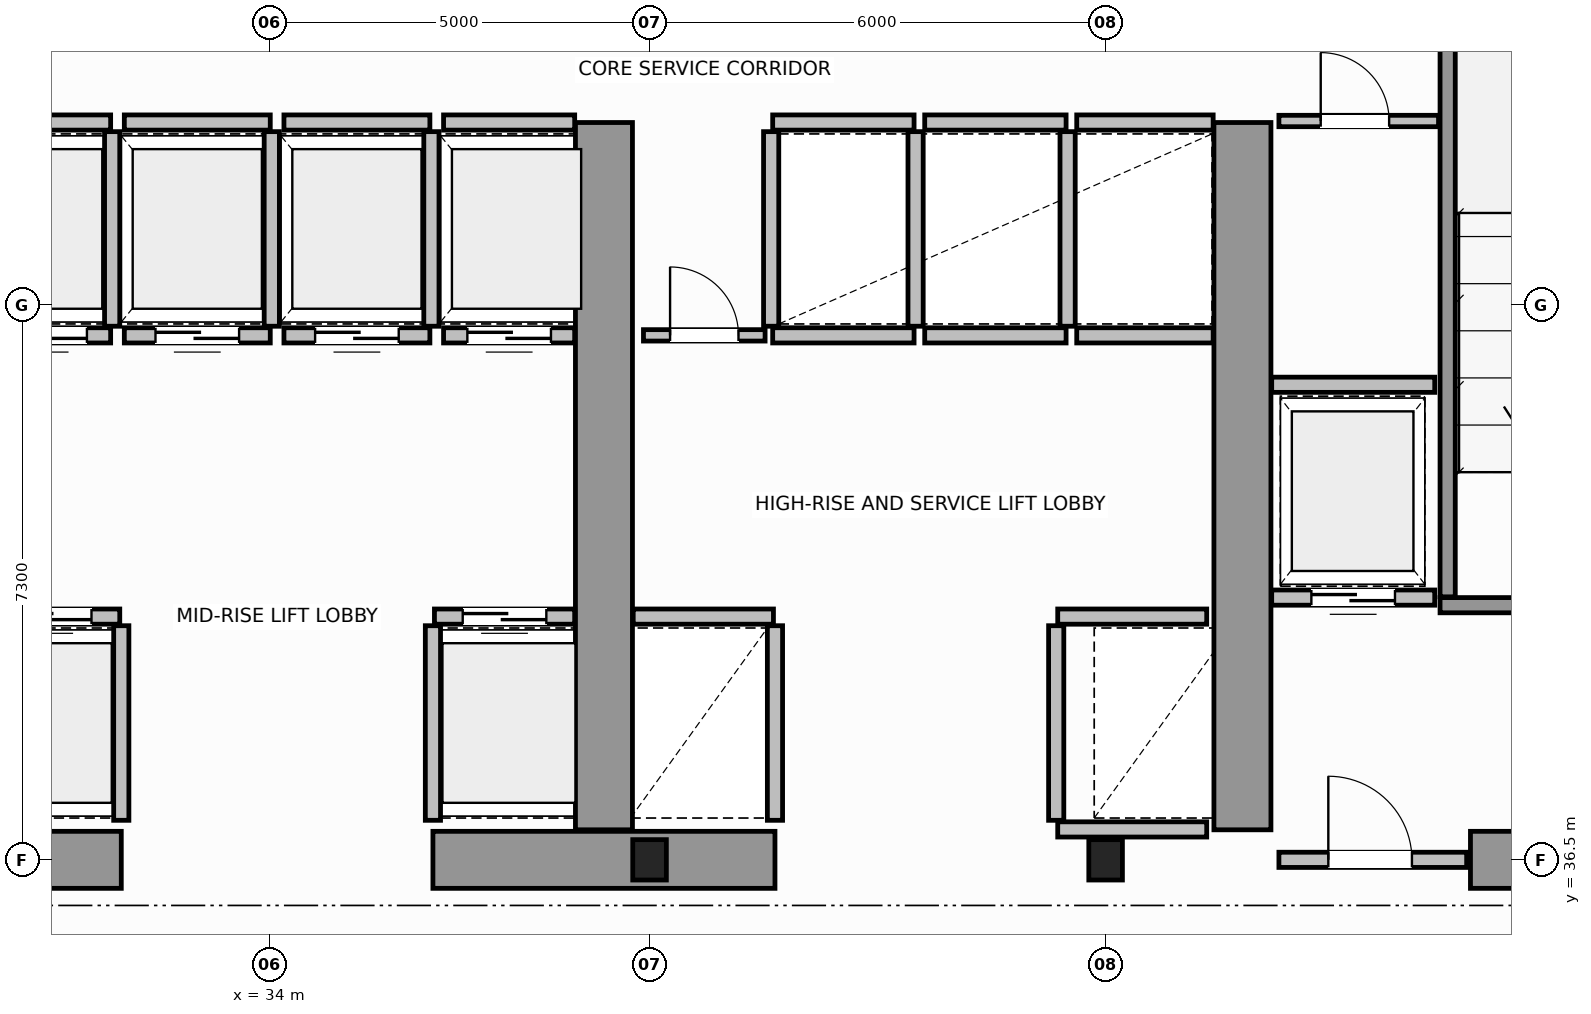
"""IFC4 building model, lengths in metres.
Left out: names, types, materials, properties, quantities, classifications, styles, units other than length and angle.
Written with IfcOpenShell. Run it as: python <this file> out.ifc"""

import sys

from ifc_helpers import new_model, si_unit, direction, frame, frame_2d, origin, origin_2d, place, context, subcontext, project, spatial, rectangle, i_section, extrude, source, transform, mapped, element, fill, save


model = new_model("IFC4")
c1 = context("Model", 3, precision=1e-05, world=origin(), true_north=direction((0.0, 1.0)))
c2 = subcontext(c1, "Body", "Model", "MODEL_VIEW")
j1 = project(units=[si_unit("LENGTHUNIT", "METRE"), si_unit("PLANEANGLEUNIT", "RADIAN")], contexts=[c1])
p1 = place(None, origin())
s1 = spatial("IfcSite", under=j1, at=p1, CompositionType="ELEMENT")
p2 = place(p1, origin())
s2 = spatial("IfcBuilding", under=s1, at=p2, CompositionType="ELEMENT")
p3 = place(p2, frame((0.0, 0.0, 114.8)))
s3 = spatial("IfcBuildingStorey", under=s2, at=p3, CompositionType="ELEMENT", Elevation=114.8)
m1 = source(origin(), c2, "Body", "SweptSolid", [
    extrude(i_section(OverallWidth=0.442, OverallDepth=0.531, WebThickness=0.065, FlangeThickness=0.076, FilletRadius=0.015, at=origin_2d()), origin(), (0.0, 0.0, 1.0), 3.8),
])
for number, where, z_axis, x_axis in (
    (1, (39.0, 36.5, 0.0), (0.0, 0.0, 1.0), (1.0, 0.0, 0.0)),
    (2, (45.0, 36.5, 0.0), (0.0, 0.0, 1.0), (1.0, 0.0, 0.0)),
):
    element("IfcColumn", number, at=place(p3, frame(where, z_axis=z_axis, x_axis=x_axis)), inside=s3, PredefinedType="COLUMN", context=c2, shape_type="MappedRepresentation", body=[
        mapped(m1, transform((0.0, 0.0, 0.0), scale=1.0)),
    ])
for number, where, z_axis, x_axis in (
    (3, (27.55, 36.5, 0.0), (0.0, 0.0, 1.0), (1.0, 0.0, 0.0)),
    (4, (36.15, 36.5, 0.0), (0.0, 0.0, 1.0), (1.0, 0.0, 0.0)),
):
    element("IfcWall", number, at=place(p3, frame(where, z_axis=z_axis, x_axis=x_axis)), inside=s3, PredefinedType="SHEAR", context=c2, shape_type="SweptSolid", body=[
        extrude(rectangle(XDim=4.5, YDim=0.75, at=frame_2d((2.25, 0.0))), origin(), (0.0, 0.0, 1.0), 3.8),
    ])
p4 = place(p3, frame((49.8, 36.5, 0.0), z_axis=(0.0, 0.0, 1.0), x_axis=(1.0, 0.0, 0.0)))
e5 = element("IfcWall", 5, at=p4, inside=s3, PredefinedType="SHEAR", context=c2, shape_type="SweptSolid", body=[
    extrude(rectangle(XDim=3.805, YDim=0.75, at=frame_2d((1.902, 0.0))), origin(), (0.0, 0.0, 1.0), 2.38),
])
for number, where, z_axis, x_axis in (
    (6, (38.4, 36.895, 0.0), (0.0, 0.0, 1.0), (0.0, 1.0, 0.0)),
    (7, (46.8, 36.895, 0.0), (0.0, 0.0, 1.0), (0.0, 1.0, 0.0)),
):
    element("IfcWall", number, at=place(p3, frame(where, z_axis=z_axis, x_axis=x_axis)), inside=s3, PredefinedType="SHEAR", context=c2, shape_type="SweptSolid", body=[
        extrude(rectangle(XDim=9.305, YDim=0.75, at=frame_2d((4.652, 0.0))), origin(), (0.0, 0.0, 1.0), 3.8),
    ])
p5 = place(p3, frame((49.4, 39.85, 0.0), z_axis=(0.0, 0.0, 1.0), x_axis=(1.0, 0.0, 0.0)))
e8 = element("IfcWall", 8, at=p5, inside=s3, PredefinedType="SOLIDWALL", context=c2, shape_type="SweptSolid", body=[
    extrude(rectangle(XDim=4.225, YDim=0.2, at=frame_2d((2.113, 0.0))), origin(), (0.0, 0.0, 1.0), 3.8),
])
p6 = place(p5, frame((1.325, 0.0, 0.0)))
e9 = element("IfcOpeningElement", 9, at=p6, cuts=e8, PredefinedType="OPENING", context=c2, shape_type="SweptSolid", body=[
    extrude(rectangle(XDim=1.1, YDim=2.15, at=frame_2d((0.55, 1.075))), frame((0.0, 0.11, 0.0), z_axis=(0.0, -1.0, 0.0), x_axis=(1.0, 0.0, 0.0)), (0.0, 0.0, 1.0), 0.22),
])
p7 = place(p3, frame((49.5, 39.96, 0.0), z_axis=(0.0, 0.0, 1.0), x_axis=(0.0, 1.0, 0.0)))
e10 = element("IfcWall", 10, at=p7, inside=s3, PredefinedType="SOLIDWALL", context=c2, shape_type="SweptSolid", body=[
    extrude(rectangle(XDim=9.93, YDim=0.2, at=frame_2d((4.965, 0.0))), origin(), (0.0, 0.0, 1.0), 3.8),
])
p8 = place(p3, frame((47.28, 36.5, 0.0), z_axis=(0.0, 0.0, 1.0), x_axis=(1.0, 0.0, 0.0)))
e11 = element("IfcWall", 11, at=p8, inside=s3, PredefinedType="SOLIDWALL", context=c2, shape_type="SweptSolid", body=[
    extrude(rectangle(XDim=2.47, YDim=0.2, at=frame_2d((1.235, 0.0))), origin(), (0.0, 0.0, 1.0), 2.37),
])
p9 = place(p8, frame((0.65, 0.0, 0.0)))
e12 = element("IfcOpeningElement", 12, at=p9, cuts=e11, PredefinedType="OPENING", context=c2, shape_type="SweptSolid", body=[
    extrude(rectangle(XDim=1.1, YDim=2.15, at=frame_2d((0.55, 1.075))), frame((0.0, 0.11, 0.0), z_axis=(0.0, -1.0, 0.0), x_axis=(1.0, 0.0, 0.0)), (0.0, 0.0, 1.0), 0.22),
])
p10 = place(p3, frame((30.185, 39.7, 0.0), z_axis=(0.0, 0.0, 1.0), x_axis=(1.0, 0.0, 0.0)))
e13 = element("IfcWall", 13, at=p10, inside=s3, PredefinedType="SOLIDWALL", context=c2, shape_type="SweptSolid", body=[
    extrude(rectangle(XDim=1.845, YDim=0.2, at=frame_2d((0.922, 0.0))), origin(), (0.0, 0.0, 1.0), 3.58),
])
p11 = place(p10, frame((0.373, 0.0, 0.0)))
e14 = element("IfcOpeningElement", 14, at=p11, cuts=e13, PredefinedType="OPENING", context=c2, shape_type="SweptSolid", body=[
    extrude(rectangle(XDim=1.1, YDim=2.15, at=frame_2d((0.55, 1.075))), frame((0.0, 0.11, 0.0), z_axis=(0.0, -1.0, 0.0), x_axis=(1.0, 0.0, 0.0)), (0.0, 0.0, 1.0), 0.22),
])
p12 = place(p3, frame((32.05, 37.02, 0.0), z_axis=(0.0, 0.0, 1.0), x_axis=(0.0, 1.0, 0.0)))
e15 = element("IfcWall", 15, at=p12, inside=s3, PredefinedType="SOLIDWALL", context=c2, shape_type="SweptSolid", body=[
    extrude(rectangle(XDim=2.56, YDim=0.2, at=frame_2d((1.28, 0.0))), origin(), (0.0, 0.0, 1.0), 3.58),
])
p13 = place(p3, frame((36.17, 39.7, 0.0), z_axis=(0.0, 0.0, 1.0), x_axis=(1.0, 0.0, 0.0)))
e16 = element("IfcWall", 16, at=p13, inside=s3, PredefinedType="SOLIDWALL", context=c2, shape_type="SweptSolid", body=[
    extrude(rectangle(XDim=1.845, YDim=0.2, at=frame_2d((0.922, 0.0))), origin(), (0.0, 0.0, 1.0), 3.58),
])
p14 = place(p13, frame((0.372, 0.0, 0.0)))
e17 = element("IfcOpeningElement", 17, at=p14, cuts=e16, PredefinedType="OPENING", context=c2, shape_type="SweptSolid", body=[
    extrude(rectangle(XDim=1.1, YDim=2.15, at=frame_2d((0.55, 1.075))), frame((0.0, 0.11, 0.0), z_axis=(0.0, -1.0, 0.0), x_axis=(1.0, 0.0, 0.0)), (0.0, 0.0, 1.0), 0.22),
])
p15 = place(p3, frame((36.15, 37.02, 0.0), z_axis=(0.0, 0.0, 1.0), x_axis=(0.0, 1.0, 0.0)))
e18 = element("IfcWall", 18, at=p15, inside=s3, PredefinedType="SOLIDWALL", context=c2, shape_type="SweptSolid", body=[
    extrude(rectangle(XDim=2.56, YDim=0.2, at=frame_2d((1.28, 0.0))), origin(), (0.0, 0.0, 1.0), 3.58),
])
p16 = place(p3, frame((30.185, 43.4, 0.0), z_axis=(0.0, 0.0, 1.0), x_axis=(1.0, 0.0, 0.0)))
e19 = element("IfcWall", 19, at=p16, inside=s3, PredefinedType="SOLIDWALL", context=c2, shape_type="SweptSolid", body=[
    extrude(rectangle(XDim=1.725, YDim=0.2, at=frame_2d((0.862, 0.0))), origin(), (0.0, 0.0, 1.0), 3.58),
])
p17 = place(p16, frame((0.313, 0.0, 0.0)))
e20 = element("IfcOpeningElement", 20, at=p17, cuts=e19, PredefinedType="OPENING", context=c2, shape_type="SweptSolid", body=[
    extrude(rectangle(XDim=1.1, YDim=2.15, at=frame_2d((0.55, 1.075))), frame((0.0, 0.11, 0.0), z_axis=(0.0, -1.0, 0.0), x_axis=(1.0, 0.0, 0.0)), (0.0, 0.0, 1.0), 0.22),
])
p18 = place(p3, frame((30.185, 46.2, 0.0), z_axis=(0.0, 0.0, 1.0), x_axis=(1.0, 0.0, 0.0)))
e21 = element("IfcWall", 21, at=p18, inside=s3, PredefinedType="SOLIDWALL", context=c2, shape_type="SweptSolid", body=[
    extrude(rectangle(XDim=1.725, YDim=0.2, at=frame_2d((0.862, 0.0))), origin(), (0.0, 0.0, 1.0), 3.58),
])
p19 = place(p3, frame((31.93, 43.52, 0.0), z_axis=(0.0, 0.0, 1.0), x_axis=(0.0, 1.0, 0.0)))
e22 = element("IfcWall", 22, at=p19, inside=s3, PredefinedType="SOLIDWALL", context=c2, shape_type="SweptSolid", body=[
    extrude(rectangle(XDim=2.56, YDim=0.2, at=frame_2d((1.28, 0.0))), origin(), (0.0, 0.0, 1.0), 3.58),
])
p20 = place(p3, frame((32.09, 43.4, 0.0), z_axis=(0.0, 0.0, 1.0), x_axis=(1.0, 0.0, 0.0)))
e23 = element("IfcWall", 23, at=p20, inside=s3, PredefinedType="SOLIDWALL", context=c2, shape_type="SweptSolid", body=[
    extrude(rectangle(XDim=1.92, YDim=0.2, at=frame_2d((0.96, 0.0))), origin(), (0.0, 0.0, 1.0), 3.58),
])
p21 = place(p20, frame((0.41, 0.0, 0.0)))
e24 = element("IfcOpeningElement", 24, at=p21, cuts=e23, PredefinedType="OPENING", context=c2, shape_type="SweptSolid", body=[
    extrude(rectangle(XDim=1.1, YDim=2.15, at=frame_2d((0.55, 1.075))), frame((0.0, 0.11, 0.0), z_axis=(0.0, -1.0, 0.0), x_axis=(1.0, 0.0, 0.0)), (0.0, 0.0, 1.0), 0.22),
])
p22 = place(p3, frame((32.09, 46.2, 0.0), z_axis=(0.0, 0.0, 1.0), x_axis=(1.0, 0.0, 0.0)))
e25 = element("IfcWall", 25, at=p22, inside=s3, PredefinedType="SOLIDWALL", context=c2, shape_type="SweptSolid", body=[
    extrude(rectangle(XDim=1.92, YDim=0.2, at=frame_2d((0.96, 0.0))), origin(), (0.0, 0.0, 1.0), 3.58),
])
p23 = place(p3, frame((34.03, 43.52, 0.0), z_axis=(0.0, 0.0, 1.0), x_axis=(0.0, 1.0, 0.0)))
e26 = element("IfcWall", 26, at=p23, inside=s3, PredefinedType="SOLIDWALL", context=c2, shape_type="SweptSolid", body=[
    extrude(rectangle(XDim=2.56, YDim=0.2, at=frame_2d((1.28, 0.0))), origin(), (0.0, 0.0, 1.0), 3.58),
])
p24 = place(p3, frame((34.19, 43.4, 0.0), z_axis=(0.0, 0.0, 1.0), x_axis=(1.0, 0.0, 0.0)))
e27 = element("IfcWall", 27, at=p24, inside=s3, PredefinedType="SOLIDWALL", context=c2, shape_type="SweptSolid", body=[
    extrude(rectangle(XDim=1.92, YDim=0.2, at=frame_2d((0.96, 0.0))), origin(), (0.0, 0.0, 1.0), 3.58),
])
p25 = place(p24, frame((0.41, 0.0, 0.0)))
e28 = element("IfcOpeningElement", 28, at=p25, cuts=e27, PredefinedType="OPENING", context=c2, shape_type="SweptSolid", body=[
    extrude(rectangle(XDim=1.1, YDim=2.15, at=frame_2d((0.55, 1.075))), frame((0.0, 0.11, 0.0), z_axis=(0.0, -1.0, 0.0), x_axis=(1.0, 0.0, 0.0)), (0.0, 0.0, 1.0), 0.22),
])
p26 = place(p3, frame((34.19, 46.2, 0.0), z_axis=(0.0, 0.0, 1.0), x_axis=(1.0, 0.0, 0.0)))
e29 = element("IfcWall", 29, at=p26, inside=s3, PredefinedType="SOLIDWALL", context=c2, shape_type="SweptSolid", body=[
    extrude(rectangle(XDim=1.92, YDim=0.2, at=frame_2d((0.96, 0.0))), origin(), (0.0, 0.0, 1.0), 3.58),
])
p27 = place(p3, frame((36.13, 43.52, 0.0), z_axis=(0.0, 0.0, 1.0), x_axis=(0.0, 1.0, 0.0)))
e30 = element("IfcWall", 30, at=p27, inside=s3, PredefinedType="SOLIDWALL", context=c2, shape_type="SweptSolid", body=[
    extrude(rectangle(XDim=2.56, YDim=0.2, at=frame_2d((1.28, 0.0))), origin(), (0.0, 0.0, 1.0), 3.58),
])
p28 = place(p3, frame((36.29, 43.4, 0.0), z_axis=(0.0, 0.0, 1.0), x_axis=(1.0, 0.0, 0.0)))
e31 = element("IfcWall", 31, at=p28, inside=s3, PredefinedType="SOLIDWALL", context=c2, shape_type="SweptSolid", body=[
    extrude(rectangle(XDim=1.725, YDim=0.2, at=frame_2d((0.862, 0.0))), origin(), (0.0, 0.0, 1.0), 3.58),
])
p29 = place(p28, frame((0.313, 0.0, 0.0)))
e32 = element("IfcOpeningElement", 32, at=p29, cuts=e31, PredefinedType="OPENING", context=c2, shape_type="SweptSolid", body=[
    extrude(rectangle(XDim=1.1, YDim=2.15, at=frame_2d((0.55, 1.075))), frame((0.0, 0.11, 0.0), z_axis=(0.0, -1.0, 0.0), x_axis=(1.0, 0.0, 0.0)), (0.0, 0.0, 1.0), 0.22),
])
p30 = place(p3, frame((36.29, 46.2, 0.0), z_axis=(0.0, 0.0, 1.0), x_axis=(1.0, 0.0, 0.0)))
e33 = element("IfcWall", 33, at=p30, inside=s3, PredefinedType="SOLIDWALL", context=c2, shape_type="SweptSolid", body=[
    extrude(rectangle(XDim=1.725, YDim=0.2, at=frame_2d((0.862, 0.0))), origin(), (0.0, 0.0, 1.0), 3.58),
])
p31 = place(p3, frame((38.785, 39.7, 0.0), z_axis=(0.0, 0.0, 1.0), x_axis=(1.0, 0.0, 0.0)))
e34 = element("IfcWall", 34, at=p31, inside=s3, PredefinedType="SOLIDWALL", context=c2, shape_type="SweptSolid", body=[
    extrude(rectangle(XDim=1.845, YDim=0.2, at=frame_2d((0.922, 0.0))), origin(), (0.0, 0.0, 1.0), 3.58),
])
p32 = place(p3, frame((40.65, 37.02, 0.0), z_axis=(0.0, 0.0, 1.0), x_axis=(0.0, 1.0, 0.0)))
e35 = element("IfcWall", 35, at=p32, inside=s3, PredefinedType="SOLIDWALL", context=c2, shape_type="SweptSolid", body=[
    extrude(rectangle(XDim=2.56, YDim=0.2, at=frame_2d((1.28, 0.0))), origin(), (0.0, 0.0, 1.0), 3.58),
])
p33 = place(p3, frame((44.37, 39.7, 0.0), z_axis=(0.0, 0.0, 1.0), x_axis=(1.0, 0.0, 0.0)))
e36 = element("IfcWall", 36, at=p33, inside=s3, PredefinedType="SOLIDWALL", context=c2, shape_type="SweptSolid", body=[
    extrude(rectangle(XDim=1.96, YDim=0.2, at=frame_2d((0.98, 0.0))), origin(), (0.0, 0.0, 1.0), 3.58),
])
p34 = place(p3, frame((44.37, 36.9, 0.0), z_axis=(0.0, 0.0, 1.0), x_axis=(1.0, 0.0, 0.0)))
e37 = element("IfcWall", 37, at=p34, inside=s3, PredefinedType="SOLIDWALL", context=c2, shape_type="SweptSolid", body=[
    extrude(rectangle(XDim=1.96, YDim=0.2, at=frame_2d((0.98, 0.0))), origin(), (0.0, 0.0, 1.0), 2.37),
])
p35 = place(p3, frame((44.35, 37.02, 0.0), z_axis=(0.0, 0.0, 1.0), x_axis=(0.0, 1.0, 0.0)))
e38 = element("IfcWall", 38, at=p35, inside=s3, PredefinedType="SOLIDWALL", context=c2, shape_type="SweptSolid", body=[
    extrude(rectangle(XDim=2.56, YDim=0.2, at=frame_2d((1.28, 0.0))), origin(), (0.0, 0.0, 1.0), 3.58),
])
for number, where, z_axis, x_axis in (
    (39, (40.62, 43.4, 0.0), (0.0, 0.0, 1.0), (1.0, 0.0, 0.0)),
    (40, (40.62, 46.2, 0.0), (0.0, 0.0, 1.0), (1.0, 0.0, 0.0)),
):
    element("IfcWall", number, at=place(p3, frame(where, z_axis=z_axis, x_axis=x_axis)), inside=s3, PredefinedType="SOLIDWALL", context=c2, shape_type="SweptSolid", body=[
        extrude(rectangle(XDim=1.86, YDim=0.2, at=frame_2d((0.93, 0.0))), origin(), (0.0, 0.0, 1.0), 3.58),
    ])
for number, where, z_axis, x_axis in (
    (41, (40.6, 43.52, 0.0), (0.0, 0.0, 1.0), (0.0, 1.0, 0.0)),
    (42, (42.5, 43.52, 0.0), (0.0, 0.0, 1.0), (0.0, 1.0, 0.0)),
):
    element("IfcWall", number, at=place(p3, frame(where, z_axis=z_axis, x_axis=x_axis)), inside=s3, PredefinedType="SOLIDWALL", context=c2, shape_type="SweptSolid", body=[
        extrude(rectangle(XDim=2.56, YDim=0.2, at=frame_2d((1.28, 0.0))), origin(), (0.0, 0.0, 1.0), 3.58),
    ])
for number, where, z_axis, x_axis in (
    (43, (42.62, 43.4, 0.0), (0.0, 0.0, 1.0), (1.0, 0.0, 0.0)),
    (44, (42.62, 46.2, 0.0), (0.0, 0.0, 1.0), (1.0, 0.0, 0.0)),
):
    element("IfcWall", number, at=place(p3, frame(where, z_axis=z_axis, x_axis=x_axis)), inside=s3, PredefinedType="SOLIDWALL", context=c2, shape_type="SweptSolid", body=[
        extrude(rectangle(XDim=1.86, YDim=0.2, at=frame_2d((0.93, 0.0))), origin(), (0.0, 0.0, 1.0), 3.58),
    ])
p36 = place(p3, frame((44.5, 43.52, 0.0), z_axis=(0.0, 0.0, 1.0), x_axis=(0.0, 1.0, 0.0)))
e45 = element("IfcWall", 45, at=p36, inside=s3, PredefinedType="SOLIDWALL", context=c2, shape_type="SweptSolid", body=[
    extrude(rectangle(XDim=2.56, YDim=0.2, at=frame_2d((1.28, 0.0))), origin(), (0.0, 0.0, 1.0), 3.58),
])
for number, where, z_axis, x_axis in (
    (46, (44.62, 43.4, 0.0), (0.0, 0.0, 1.0), (1.0, 0.0, 0.0)),
    (47, (44.62, 46.2, 0.0), (0.0, 0.0, 1.0), (1.0, 0.0, 0.0)),
):
    element("IfcWall", number, at=place(p3, frame(where, z_axis=z_axis, x_axis=x_axis)), inside=s3, PredefinedType="SOLIDWALL", context=c2, shape_type="SweptSolid", body=[
        extrude(rectangle(XDim=1.795, YDim=0.2, at=frame_2d((0.897, 0.0))), origin(), (0.0, 0.0, 1.0), 3.58),
    ])
p37 = place(p3, frame((47.185, 39.95, 0.0), z_axis=(0.0, 0.0, 1.0), x_axis=(1.0, 0.0, 0.0)))
e48 = element("IfcWall", 48, at=p37, inside=s3, PredefinedType="SOLIDWALL", context=c2, shape_type="SweptSolid", body=[
    extrude(rectangle(XDim=2.145, YDim=0.2, at=frame_2d((1.073, 0.0))), origin(), (0.0, 0.0, 1.0), 3.58),
])
p38 = place(p37, frame((0.522, 0.0, 0.0)))
e49 = element("IfcOpeningElement", 49, at=p38, cuts=e48, PredefinedType="OPENING", context=c2, shape_type="SweptSolid", body=[
    extrude(rectangle(XDim=1.1, YDim=2.15, at=frame_2d((0.55, 1.075))), frame((0.0, 0.11, 0.0), z_axis=(0.0, -1.0, 0.0), x_axis=(1.0, 0.0, 0.0)), (0.0, 0.0, 1.0), 0.22),
])
p39 = place(p3, frame((47.185, 42.75, 0.0), z_axis=(0.0, 0.0, 1.0), x_axis=(1.0, 0.0, 0.0)))
e50 = element("IfcWall", 50, at=p39, inside=s3, PredefinedType="SOLIDWALL", context=c2, shape_type="SweptSolid", body=[
    extrude(rectangle(XDim=2.145, YDim=0.2, at=frame_2d((1.073, 0.0))), origin(), (0.0, 0.0, 1.0), 3.58),
])
p40 = place(p3, frame((47.28, 46.22, 0.0), z_axis=(0.0, 0.0, 1.0), x_axis=(1.0, 0.0, 0.0)))
e51 = element("IfcWall", 51, at=p40, inside=s3, PredefinedType="PARTITIONING", context=c2, shape_type="SweptSolid", body=[
    extrude(rectangle(XDim=2.1, YDim=0.15, at=frame_2d((1.05, 0.0))), origin(), (0.0, 0.0, 1.0), 3.58),
])
p41 = place(p40, frame((0.55, 0.0, 0.0)))
e52 = element("IfcOpeningElement", 52, at=p41, cuts=e51, PredefinedType="OPENING", context=c2, shape_type="SweptSolid", body=[
    extrude(rectangle(XDim=0.9, YDim=2.1, at=frame_2d((0.45, 1.05))), frame((0.0, 0.085, 0.0), z_axis=(0.0, -1.0, 0.0), x_axis=(1.0, 0.0, 0.0)), (0.0, 0.0, 1.0), 0.17),
])
p42 = place(p3, frame((38.92, 43.4, 0.0), z_axis=(0.0, 0.0, 1.0), x_axis=(1.0, 0.0, 0.0)))
e53 = element("IfcWall", 53, at=p42, inside=s3, PredefinedType="PARTITIONING", context=c2, shape_type="SweptSolid", body=[
    extrude(rectangle(XDim=1.6, YDim=0.15, at=frame_2d((0.8, 0.0))), origin(), (0.0, 0.0, 1.0), 3.58),
])
p43 = place(p42, frame((0.35, 0.0, 0.0)))
e54 = element("IfcOpeningElement", 54, at=p43, cuts=e53, PredefinedType="OPENING", context=c2, shape_type="SweptSolid", body=[
    extrude(rectangle(XDim=0.9, YDim=2.1, at=frame_2d((0.45, 1.05))), frame((0.0, 0.085, 0.0), z_axis=(0.0, -1.0, 0.0), x_axis=(1.0, 0.0, 0.0)), (0.0, 0.0, 1.0), 0.17),
])
m2 = source(origin(), c2, "Body", "SweptSolid", [
    extrude(rectangle(XDim=1.1, YDim=2.15, at=frame_2d((0.55, 1.075))), frame((0.0, 0.025, 0.0), z_axis=(0.0, -1.0, 0.0), x_axis=(1.0, 0.0, 0.0)), (0.0, 0.0, 1.0), 0.05),
])
p44 = place(p9, origin())
e55 = element("IfcDoor", 55, at=p44, inside=s3, OperationType="SINGLE_SWING_LEFT", PredefinedType="DOOR", context=c2, shape_type="MappedRepresentation", body=[
    mapped(m2, transform((0.0, 0.0, 0.0), scale=1.0)),
])
fill(e12, e55)
p45 = place(p11, origin())
e56 = element("IfcDoor", 56, at=p45, inside=s3, OperationType="DOUBLE_DOOR_SLIDING", PredefinedType="DOOR", context=c2, shape_type="MappedRepresentation", body=[
    mapped(m2, transform((0.0, 0.0, 0.0), scale=1.0)),
])
fill(e14, e56)
p46 = place(p14, origin())
e57 = element("IfcDoor", 57, at=p46, inside=s3, OperationType="DOUBLE_DOOR_SLIDING", PredefinedType="DOOR", context=c2, shape_type="MappedRepresentation", body=[
    mapped(m2, transform((0.0, 0.0, 0.0), scale=1.0)),
])
fill(e17, e57)
p47 = place(p17, origin())
e58 = element("IfcDoor", 58, at=p47, inside=s3, OperationType="DOUBLE_DOOR_SLIDING", PredefinedType="DOOR", context=c2, shape_type="MappedRepresentation", body=[
    mapped(m2, transform((0.0, 0.0, 0.0), scale=1.0)),
])
fill(e20, e58)
p48 = place(p21, origin())
e59 = element("IfcDoor", 59, at=p48, inside=s3, OperationType="DOUBLE_DOOR_SLIDING", PredefinedType="DOOR", context=c2, shape_type="MappedRepresentation", body=[
    mapped(m2, transform((0.0, 0.0, 0.0), scale=1.0)),
])
fill(e24, e59)
p49 = place(p25, origin())
e60 = element("IfcDoor", 60, at=p49, inside=s3, OperationType="DOUBLE_DOOR_SLIDING", PredefinedType="DOOR", context=c2, shape_type="MappedRepresentation", body=[
    mapped(m2, transform((0.0, 0.0, 0.0), scale=1.0)),
])
fill(e28, e60)
p50 = place(p29, origin())
e61 = element("IfcDoor", 61, at=p50, inside=s3, OperationType="DOUBLE_DOOR_SLIDING", PredefinedType="DOOR", context=c2, shape_type="MappedRepresentation", body=[
    mapped(m2, transform((0.0, 0.0, 0.0), scale=1.0)),
])
fill(e32, e61)
p51 = place(p38, origin())
e62 = element("IfcDoor", 62, at=p51, inside=s3, OperationType="DOUBLE_DOOR_SLIDING", PredefinedType="DOOR", context=c2, shape_type="MappedRepresentation", body=[
    mapped(m2, transform((0.0, 0.0, 0.0), scale=1.0)),
])
fill(e49, e62)
m3 = source(origin(), c2, "Body", "SweptSolid", [
    extrude(rectangle(XDim=0.9, YDim=2.1, at=frame_2d((0.45, 1.05))), frame((0.0, 0.025, 0.0), z_axis=(0.0, -1.0, 0.0), x_axis=(1.0, 0.0, 0.0)), (0.0, 0.0, 1.0), 0.05),
])
p52 = place(p41, origin())
e63 = element("IfcDoor", 63, at=p52, inside=s3, OperationType="SINGLE_SWING_RIGHT", PredefinedType="DOOR", context=c2, shape_type="MappedRepresentation", body=[
    mapped(m3, transform((0.0, 0.0, 0.0), scale=1.0)),
])
fill(e52, e63)
p53 = place(p43, origin())
e64 = element("IfcDoor", 64, at=p53, inside=s3, OperationType="SINGLE_SWING_LEFT", PredefinedType="DOOR", context=c2, shape_type="MappedRepresentation", body=[
    mapped(m3, transform((0.0, 0.0, 0.0), scale=1.0)),
])
fill(e54, e64)
save(model, sys.argv[1])
